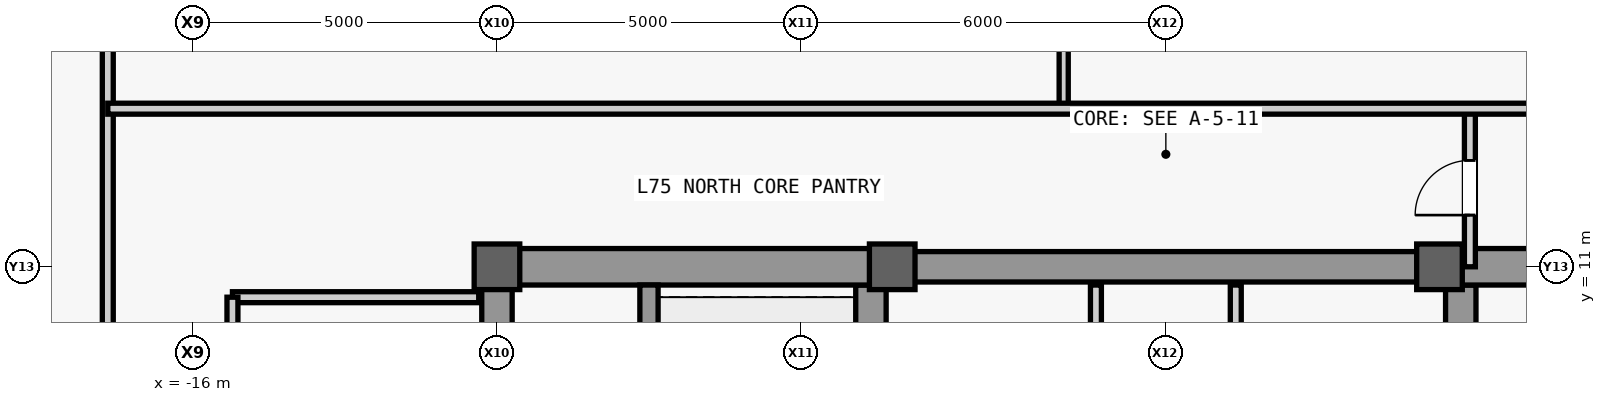
"""IFC4 building model, lengths in metres.
Left out: names, types, materials, properties, quantities, classifications, styles, units other than length and angle.
Written with IfcOpenShell. Run it as: python <this file> out.ifc"""

import sys

from ifc_helpers import new_model, si_unit, direction, frame, frame_2d, origin, origin_2d, place, context, subcontext, project, spatial, rectangle, extrude, source, transform, mapped, element, fill, save


model = new_model("IFC4")
c1 = context("Model", 3, precision=1e-05, world=origin(), true_north=direction((0.0, 1.0)))
c2 = subcontext(c1, "Body", "Model", "MODEL_VIEW")
j1 = project(units=[si_unit("LENGTHUNIT", "METRE"), si_unit("PLANEANGLEUNIT", "RADIAN")], contexts=[c1])
p1 = place(None, origin())
s1 = spatial("IfcSite", under=j1, at=p1, CompositionType="ELEMENT")
p2 = place(p1, origin())
s2 = spatial("IfcBuilding", under=s1, at=p2, CompositionType="ELEMENT")
p3 = place(p2, frame((0.0, 0.0, 317.5)))
s3 = spatial("IfcBuildingStorey", under=s2, at=p3, CompositionType="ELEMENT", Elevation=317.5)
m1 = source(origin(), c2, "Body", "SweptSolid", [
    extrude(rectangle(XDim=22.0, YDim=0.5, at=frame_2d((11.0, 0.0))), origin(), (0.0, 0.0, 1.0), 3.78),
])
p4 = place(p3, frame((-11.0, -11.0, 0.0), z_axis=(0.0, 0.0, 1.0), x_axis=(0.0, 1.0, 0.0)))
e1 = element("IfcWall", 1, at=p4, inside=s3, PredefinedType="SHEAR", context=c2, shape_type="MappedRepresentation", body=[
    mapped(m1, transform((0.0, 0.0, 0.0), scale=1.0)),
])
m2 = source(origin(), c2, "Body", "SweptSolid", [
    extrude(rectangle(XDim=1.1, YDim=2.2, at=frame_2d((0.55, 1.1))), frame((0.0, 0.26, 0.0), z_axis=(0.0, -1.0, 0.0), x_axis=(1.0, 0.0, 0.0)), (0.0, 0.0, 1.0), 0.52),
])
p5 = place(p4, frame((0.8, 0.0, 0.0)))
e2 = element("IfcOpeningElement", 2, at=p5, cuts=e1, PredefinedType="OPENING", context=c2, shape_type="MappedRepresentation", body=[
    mapped(m2, transform((0.0, 0.0, 0.0), scale=1.0)),
])
p6 = place(p4, frame((12.5, 0.0, 0.0)))
e3 = element("IfcOpeningElement", 3, at=p6, cuts=e1, PredefinedType="OPENING", context=c2, shape_type="MappedRepresentation", body=[
    mapped(m2, transform((0.0, 0.0, 0.0), scale=1.0)),
])
m3 = source(origin(), c2, "Body", "SweptSolid", [
    extrude(rectangle(XDim=0.9, YDim=2.15, at=frame_2d((0.45, 1.075))), frame((0.0, 0.26, 0.0), z_axis=(0.0, -1.0, 0.0), x_axis=(1.0, 0.0, 0.0)), (0.0, 0.0, 1.0), 0.52),
])
p7 = place(p4, frame((6.2, 0.0, 0.0)))
e4 = element("IfcOpeningElement", 4, at=p7, cuts=e1, PredefinedType="OPENING", context=c2, shape_type="MappedRepresentation", body=[
    mapped(m3, transform((0.0, 0.0, 0.0), scale=1.0)),
])
p8 = place(p4, frame((8.05, 0.0, 0.0)))
e5 = element("IfcOpeningElement", 5, at=p8, cuts=e1, PredefinedType="OPENING", context=c2, shape_type="MappedRepresentation", body=[
    mapped(m3, transform((0.0, 0.0, 0.0), scale=1.0)),
])
m4 = source(origin(), c2, "Body", "SweptSolid", [
    extrude(rectangle(XDim=1.2, YDim=2.3, at=frame_2d((0.6, 1.15))), frame((0.0, 0.26, 0.0), z_axis=(0.0, -1.0, 0.0), x_axis=(1.0, 0.0, 0.0)), (0.0, 0.0, 1.0), 0.52),
])
p9 = place(p4, frame((14.6, 0.0, 0.0)))
e6 = element("IfcOpeningElement", 6, at=p9, cuts=e1, PredefinedType="OPENING", context=c2, shape_type="MappedRepresentation", body=[
    mapped(m4, transform((0.0, 0.0, 0.0), scale=1.0)),
])
p10 = place(p4, frame((18.2, 0.0, 0.0)))
e7 = element("IfcOpeningElement", 7, at=p10, cuts=e1, PredefinedType="OPENING", context=c2, shape_type="MappedRepresentation", body=[
    mapped(m4, transform((0.0, 0.0, 0.0), scale=1.0)),
])
m5 = source(origin(), c2, "Body", "SweptSolid", [
    extrude(rectangle(XDim=1.3, YDim=2.3, at=frame_2d((0.65, 1.15))), frame((0.0, 0.26, 0.0), z_axis=(0.0, -1.0, 0.0), x_axis=(1.0, 0.0, 0.0)), (0.0, 0.0, 1.0), 0.52),
])
p11 = place(p4, frame((2.7, 0.0, 0.0)))
e8 = element("IfcOpeningElement", 8, at=p11, cuts=e1, PredefinedType="OPENING", context=c2, shape_type="MappedRepresentation", body=[
    mapped(m5, transform((0.0, 0.0, 0.0), scale=1.0)),
])
m6 = source(origin(), c2, "Body", "SweptSolid", [
    extrude(rectangle(XDim=21.4, YDim=0.5, at=frame_2d((10.7, 0.0))), origin(), (0.0, 0.0, 1.0), 3.78),
])
for number, where, z_axis, x_axis in (
    (9, (-4.85, -10.7, 0.0), (0.0, 0.0, 1.0), (0.0, 1.0, 0.0)),
    (10, (4.85, -10.7, 0.0), (0.0, 0.0, 1.0), (0.0, 1.0, 0.0)),
):
    element("IfcWall", number, at=place(p3, frame(where, z_axis=z_axis, x_axis=x_axis)), inside=s3, PredefinedType="SHEAR", context=c2, shape_type="MappedRepresentation", body=[
        mapped(m6, transform((0.0, 0.0, 0.0), scale=1.0)),
    ])
m7 = source(origin(), c2, "Body", "SweptSolid", [
    extrude(rectangle(XDim=5.9, YDim=0.6, at=frame_2d((2.95, 0.0))), origin(), (0.0, 0.0, 1.0), 3.78),
])
p12 = place(p3, frame((-10.75, 11.0, 0.0), z_axis=(0.0, 0.0, 1.0), x_axis=(1.0, 0.0, 0.0)))
e11 = element("IfcWall", 11, at=p12, inside=s3, PredefinedType="SHEAR", context=c2, shape_type="MappedRepresentation", body=[
    mapped(m7, transform((0.0, 0.0, 0.0), scale=1.0)),
])
p13 = place(p3, frame((4.85, 11.0, 0.0), z_axis=(0.0, 0.0, 1.0), x_axis=(1.0, 0.0, 0.0)))
e12 = element("IfcWall", 12, at=p13, inside=s3, PredefinedType="SHEAR", context=c2, shape_type="MappedRepresentation", body=[
    mapped(m7, transform((0.0, 0.0, 0.0), scale=1.0)),
])
m8 = source(origin(), c2, "Body", "SweptSolid", [
    extrude(rectangle(XDim=1.05, YDim=2.2, at=frame_2d((0.525, 1.1))), frame((0.0, 0.31, 0.0), z_axis=(0.0, -1.0, 0.0), x_axis=(1.0, 0.0, 0.0)), (0.0, 0.0, 1.0), 0.62),
])
p14 = place(p13, frame((1.375, 0.0, 0.0)))
e13 = element("IfcOpeningElement", 13, at=p14, cuts=e12, PredefinedType="OPENING", context=c2, shape_type="MappedRepresentation", body=[
    mapped(m8, transform((0.0, 0.0, 0.0), scale=1.0)),
])
m9 = source(origin(), c2, "Body", "SweptSolid", [
    extrude(rectangle(XDim=9.2, YDim=0.5, at=frame_2d((4.6, 0.0))), origin(), (0.0, 0.0, 1.0), 3.78),
])
p15 = place(p3, frame((-4.6, 11.0, 0.0), z_axis=(0.0, 0.0, 1.0), x_axis=(1.0, 0.0, 0.0)))
e14 = element("IfcWall", 14, at=p15, inside=s3, PredefinedType="SHEAR", context=c2, shape_type="MappedRepresentation", body=[
    mapped(m9, transform((0.0, 0.0, 0.0), scale=1.0)),
])
m10 = source(origin(), c2, "Body", "SweptSolid", [
    extrude(rectangle(XDim=0.75, YDim=0.75, at=origin_2d()), origin(), (0.0, 0.0, 1.0), 4.0),
])
for number, where, z_axis, x_axis in (
    (15, (-11.0, 11.0, 0.0), (0.0, 0.0, 1.0), (1.0, 0.0, 0.0)),
    (16, (-4.5, 11.0, 0.0), (0.0, 0.0, 1.0), (1.0, 0.0, 0.0)),
    (17, (4.5, 11.0, 0.0), (0.0, 0.0, 1.0), (1.0, 0.0, 0.0)),
):
    element("IfcColumn", number, at=place(p3, frame(where, z_axis=z_axis, x_axis=x_axis)), inside=s3, PredefinedType="COLUMN", context=c2, shape_type="MappedRepresentation", body=[
        mapped(m10, transform((0.0, 0.0, 0.0), scale=1.0)),
    ])
m11 = source(origin(), c2, "Body", "SweptSolid", [
    extrude(rectangle(XDim=7.75, YDim=0.3, at=frame_2d((3.875, 0.0))), origin(), (0.0, 0.0, 1.0), 3.78),
])
p16 = place(p3, frame((-8.5, 2.95, 0.0), z_axis=(0.0, 0.0, 1.0), x_axis=(0.0, 1.0, 0.0)))
e18 = element("IfcWall", 18, at=p16, inside=s3, PredefinedType="SHEAR", context=c2, shape_type="MappedRepresentation", body=[
    mapped(m11, transform((0.0, 0.0, 0.0), scale=1.0)),
])
m12 = source(origin(), c2, "Body", "SweptSolid", [
    extrude(rectangle(XDim=4.05, YDim=0.18, at=frame_2d((2.025, 0.0))), origin(), (0.0, 0.0, 1.0), 3.78),
])
p17 = place(p3, frame((-15.35, 10.5, 0.0), z_axis=(0.0, 0.0, 1.0), x_axis=(1.0, 0.0, 0.0)))
e19 = element("IfcWall", 19, at=p17, inside=s3, PredefinedType="PARTITIONING", context=c2, shape_type="MappedRepresentation", body=[
    mapped(m12, transform((0.0, 0.0, 0.0), scale=1.0)),
])
m13 = source(origin(), c2, "Body", "SweptSolid", [
    extrude(rectangle(XDim=16.6, YDim=0.18, at=frame_2d((8.3, 0.0))), origin(), (0.0, 0.0, 1.0), 3.78),
])
p18 = place(p3, frame((-15.35, -6.1, 0.0), z_axis=(0.0, 0.0, 1.0), x_axis=(0.0, 1.0, 0.0)))
e20 = element("IfcWall", 20, at=p18, inside=s3, PredefinedType="PARTITIONING", context=c2, shape_type="MappedRepresentation", body=[
    mapped(m13, transform((0.0, 0.0, 0.0), scale=1.0)),
])
m14 = source(origin(), c2, "Body", "SweptSolid", [
    extrude(rectangle(XDim=1.8, YDim=2.25, at=frame_2d((0.9, 1.125))), frame((0.0, 0.1, 0.0), z_axis=(0.0, -1.0, 0.0), x_axis=(1.0, 0.0, 0.0)), (0.0, 0.0, 1.0), 0.2),
])
p19 = place(p18, frame((2.7, 0.0, 0.0)))
e21 = element("IfcOpeningElement", 21, at=p19, cuts=e20, PredefinedType="OPENING", context=c2, shape_type="MappedRepresentation", body=[
    mapped(m14, transform((0.0, 0.0, 0.0), scale=1.0)),
])
p20 = place(p18, frame((11.0, 0.0, 0.0)))
e22 = element("IfcOpeningElement", 22, at=p20, cuts=e20, PredefinedType="OPENING", context=c2, shape_type="MappedRepresentation", body=[
    mapped(m14, transform((0.0, 0.0, 0.0), scale=1.0)),
])
m15 = source(origin(), c2, "Body", "SweptSolid", [
    extrude(rectangle(XDim=5.4, YDim=0.18, at=frame_2d((2.7, 0.0))), origin(), (0.0, 0.0, 1.0), 3.78),
])
p21 = place(p3, frame((-1.15, 5.3, 0.0), z_axis=(0.0, 0.0, 1.0), x_axis=(0.0, 1.0, 0.0)))
e23 = element("IfcWall", 23, at=p21, inside=s3, PredefinedType="PARTITIONING", context=c2, shape_type="MappedRepresentation", body=[
    mapped(m15, transform((0.0, 0.0, 0.0), scale=1.0)),
])
m16 = source(origin(), c2, "Body", "SweptSolid", [
    extrude(rectangle(XDim=0.9, YDim=2.15, at=frame_2d((0.45, 1.075))), frame((0.0, 0.1, 0.0), z_axis=(0.0, -1.0, 0.0), x_axis=(1.0, 0.0, 0.0)), (0.0, 0.0, 1.0), 0.2),
])
p22 = place(p21, frame((0.9, 0.0, 0.0)))
e24 = element("IfcOpeningElement", 24, at=p22, cuts=e23, PredefinedType="OPENING", context=c2, shape_type="MappedRepresentation", body=[
    mapped(m16, transform((0.0, 0.0, 0.0), scale=1.0)),
])
p23 = place(p21, frame((3.6, 0.0, 0.0)))
e25 = element("IfcOpeningElement", 25, at=p23, cuts=e23, PredefinedType="OPENING", context=c2, shape_type="MappedRepresentation", body=[
    mapped(m16, transform((0.0, 0.0, 0.0), scale=1.0)),
])
p24 = place(p3, frame((1.15, 5.3, 0.0), z_axis=(0.0, 0.0, 1.0), x_axis=(0.0, 1.0, 0.0)))
e26 = element("IfcWall", 26, at=p24, inside=s3, PredefinedType="PARTITIONING", context=c2, shape_type="MappedRepresentation", body=[
    mapped(m15, transform((0.0, 0.0, 0.0), scale=1.0)),
])
p25 = place(p24, frame((2.25, 0.0, 0.0)))
e27 = element("IfcOpeningElement", 27, at=p25, cuts=e26, PredefinedType="OPENING", context=c2, shape_type="MappedRepresentation", body=[
    mapped(m16, transform((0.0, 0.0, 0.0), scale=1.0)),
])
m17 = source(origin(), c2, "Body", "SweptSolid", [
    extrude(rectangle(XDim=8.4, YDim=0.18, at=frame_2d((4.2, 0.0))), origin(), (0.0, 0.0, 1.0), 3.78),
])
p26 = place(p3, frame((-17.4, 7.2, 0.0), z_axis=(0.0, 0.0, 1.0), x_axis=(0.0, 1.0, 0.0)))
e28 = element("IfcWall", 28, at=p26, inside=s3, PredefinedType="PARTITIONING", context=c2, shape_type="MappedRepresentation", body=[
    mapped(m17, transform((0.0, 0.0, 0.0), scale=1.0)),
])
m18 = source(origin(), c2, "Body", "SweptSolid", [
    extrude(rectangle(XDim=2.6, YDim=0.18, at=frame_2d((1.3, 0.0))), origin(), (0.0, 0.0, 1.0), 3.78),
])
p27 = place(p3, frame((5.0, 11.0, 0.0), z_axis=(0.0, 0.0, 1.0), x_axis=(0.0, 1.0, 0.0)))
e29 = element("IfcWall", 29, at=p27, inside=s3, PredefinedType="PARTITIONING", context=c2, shape_type="MappedRepresentation", body=[
    mapped(m18, transform((0.0, 0.0, 0.0), scale=1.0)),
])
p28 = place(p27, frame((0.85, 0.0, 0.0)))
e30 = element("IfcOpeningElement", 30, at=p28, cuts=e29, PredefinedType="OPENING", context=c2, shape_type="MappedRepresentation", body=[
    mapped(m16, transform((0.0, 0.0, 0.0), scale=1.0)),
])
m19 = source(origin(), c2, "Body", "SweptSolid", [
    extrude(rectangle(XDim=14.4, YDim=0.15, at=frame_2d((7.2, 0.0))), origin(), (0.0, 0.0, 1.0), 3.78),
])
p29 = place(p3, frame((-1.68, 13.6, 0.0), z_axis=(0.0, 0.0, 1.0), x_axis=(0.0, 1.0, 0.0)))
e31 = element("IfcWall", 31, at=p29, inside=s3, PredefinedType="PARTITIONING", context=c2, shape_type="MappedRepresentation", body=[
    mapped(m19, transform((0.0, 0.0, 0.0), scale=1.0)),
])
m20 = source(origin(), c2, "Body", "SweptSolid", [
    extrude(rectangle(XDim=0.95, YDim=2.15, at=frame_2d((0.475, 1.075))), frame((0.0, 0.085, 0.0), z_axis=(0.0, -1.0, 0.0), x_axis=(1.0, 0.0, 0.0)), (0.0, 0.0, 1.0), 0.17),
])
p30 = place(p29, frame((6.725, 0.0, 0.0)))
e32 = element("IfcOpeningElement", 32, at=p30, cuts=e31, PredefinedType="OPENING", context=c2, shape_type="MappedRepresentation", body=[
    mapped(m20, transform((0.0, 0.0, 0.0), scale=1.0)),
])
m21 = source(origin(), c2, "Body", "SweptSolid", [
    extrude(rectangle(XDim=32.75, YDim=0.18, at=frame_2d((16.375, 0.0))), origin(), (0.0, 0.0, 1.0), 3.78),
])
p31 = place(p3, frame((-17.4, 13.6, 0.0), z_axis=(0.0, 0.0, 1.0), x_axis=(1.0, 0.0, 0.0)))
e33 = element("IfcWall", 33, at=p31, inside=s3, PredefinedType="PARTITIONING", context=c2, shape_type="MappedRepresentation", body=[
    mapped(m21, transform((0.0, 0.0, 0.0), scale=1.0)),
])
m22 = source(origin(), c2, "Body", "SweptSolid", [
    extrude(rectangle(XDim=1.05, YDim=2.2, at=frame_2d((0.525, 1.1))), frame((0.0, 0.1, 0.0), z_axis=(0.0, -1.0, 0.0), x_axis=(1.0, 0.0, 0.0)), (0.0, 0.0, 1.0), 0.2),
])
p32 = place(p31, frame((27.075, 0.0, 0.0)))
e34 = element("IfcOpeningElement", 34, at=p32, cuts=e33, PredefinedType="OPENING", context=c2, shape_type="MappedRepresentation", body=[
    mapped(m22, transform((0.0, 0.0, 0.0), scale=1.0)),
])
m23 = source(origin(), c2, "Body", "SweptSolid", [
    extrude(rectangle(XDim=0.9, YDim=2.15, at=frame_2d((0.45, 1.075))), frame((0.0, 0.025, 0.0), z_axis=(0.0, -1.0, 0.0), x_axis=(1.0, 0.0, 0.0)), (0.0, 0.0, 1.0), 0.05),
])
p33 = place(p28, origin())
e35 = element("IfcDoor", 35, at=p33, inside=s3, OperationType="SINGLE_SWING_LEFT", PredefinedType="DOOR", context=c2, shape_type="MappedRepresentation", body=[
    mapped(m23, transform((0.0, 0.0, 0.0), scale=1.0)),
])
fill(e30, e35)
save(model, sys.argv[1])
